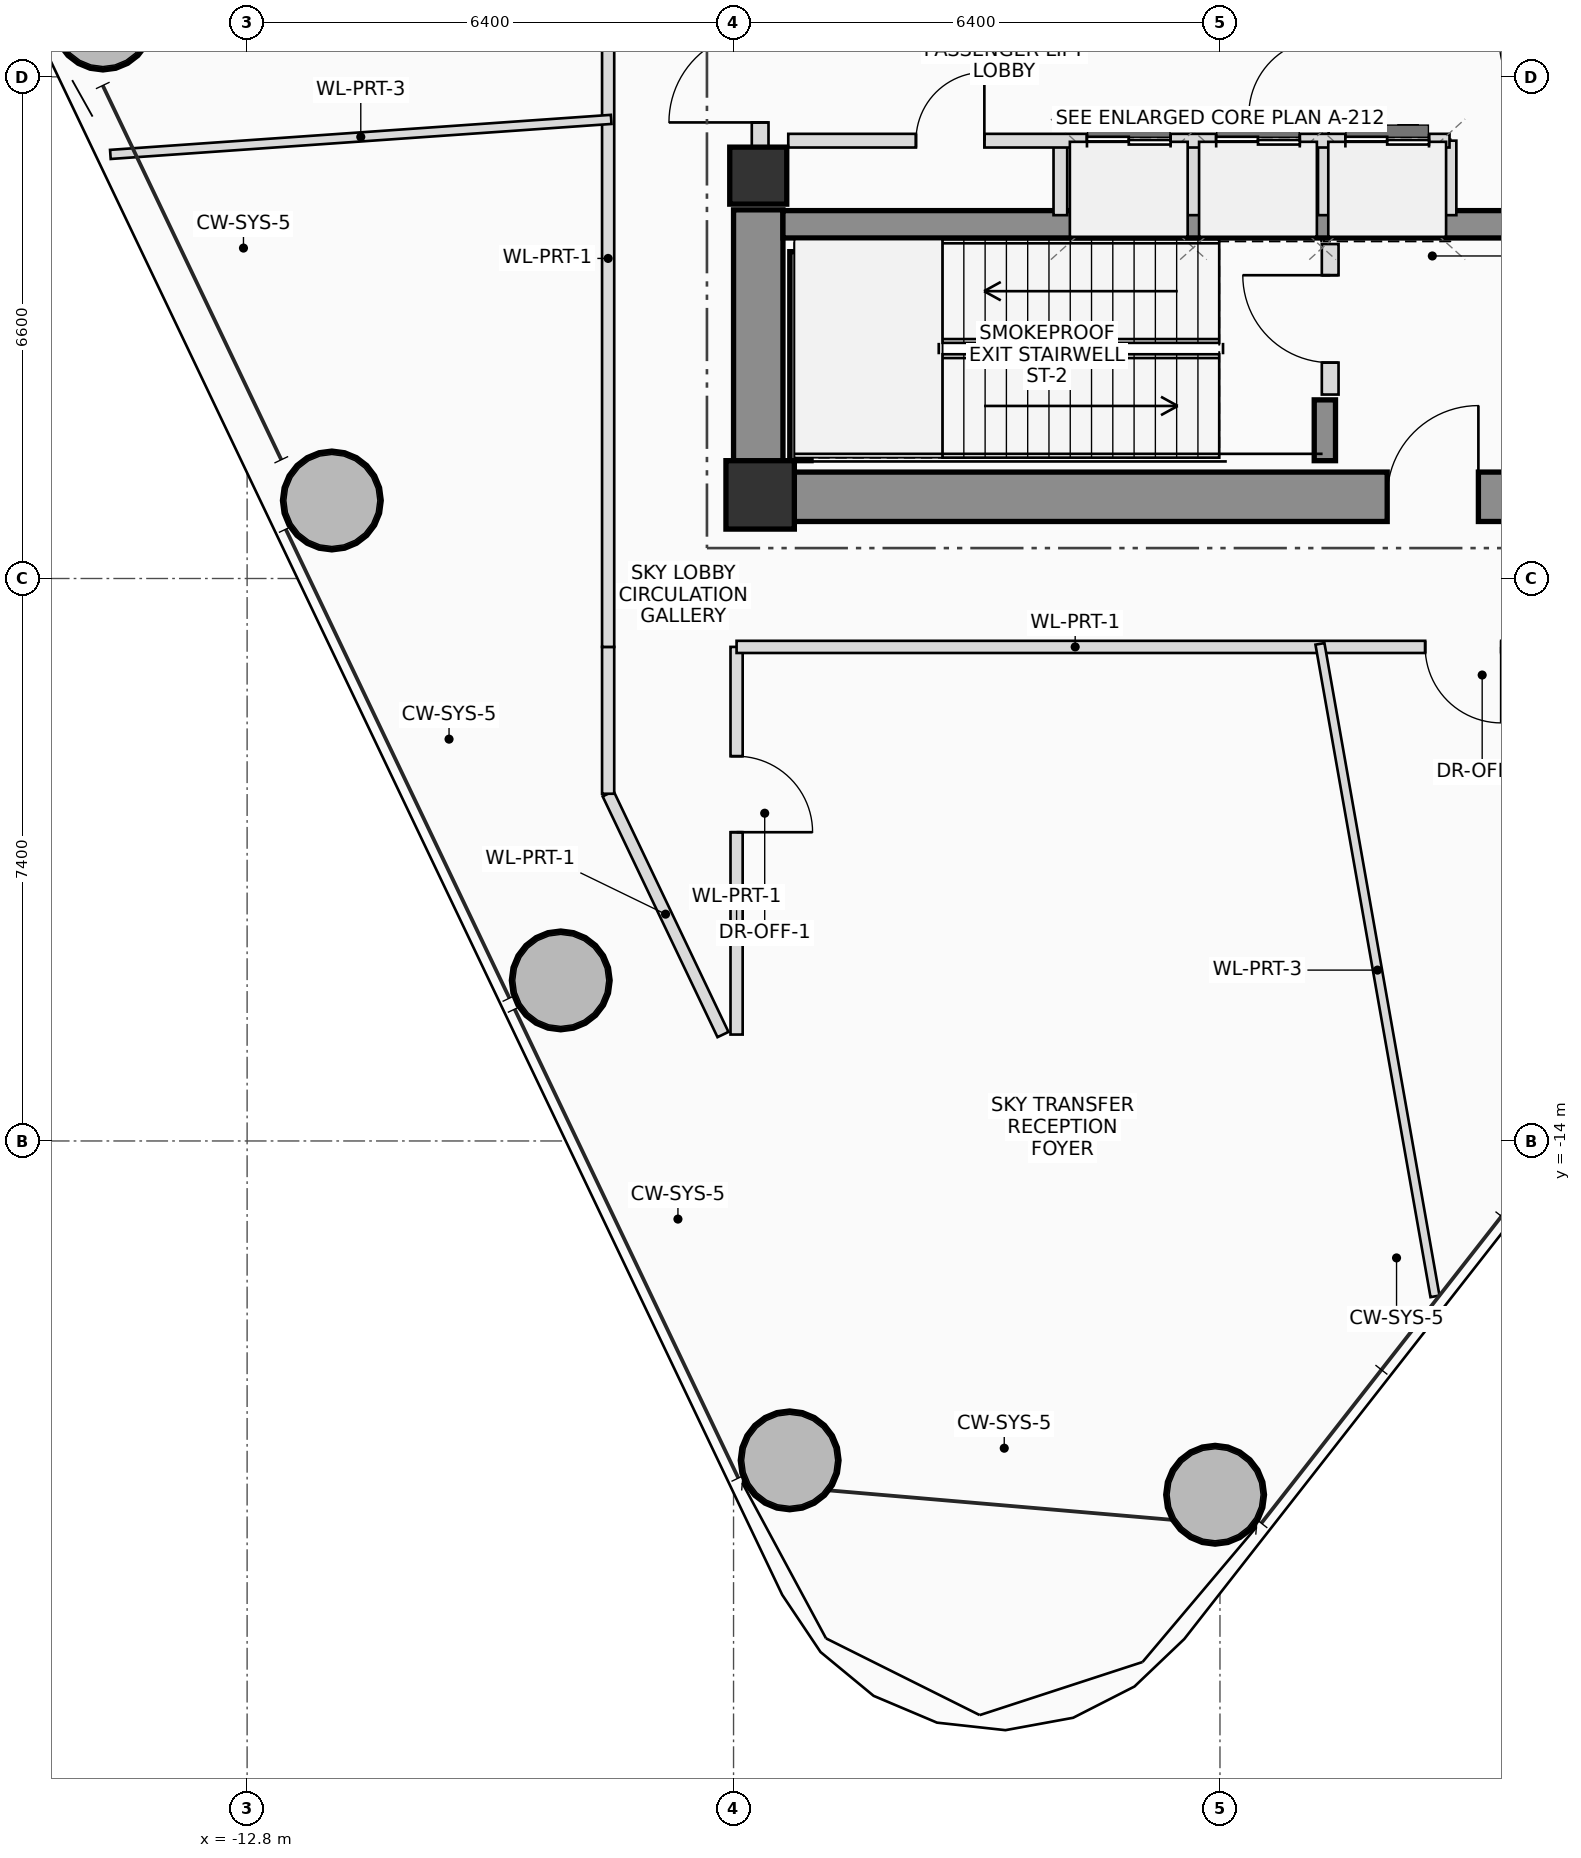
"""IFC4 building model, lengths in metres.
Left out: names, types, materials, properties, quantities, classifications, styles, units other than length and angle.
Written with IfcOpenShell. Run it as: python <this file> out.ifc"""

import sys

from ifc_helpers import new_model, si_unit, direction, frame, frame_2d, origin, origin_2d, place, context, subcontext, project, spatial, rectangle, hollow_circle, extrude, source, transform, mapped, element, fill, save


model = new_model("IFC4")
c1 = context("Model", 3, precision=1e-05, world=origin(), true_north=direction((0.0, 1.0)))
c2 = subcontext(c1, "Body", "Model", "MODEL_VIEW")
j1 = project(units=[si_unit("LENGTHUNIT", "METRE"), si_unit("PLANEANGLEUNIT", "RADIAN")], contexts=[c1])
p1 = place(None, origin())
s1 = spatial("IfcSite", under=j1, at=p1, CompositionType="ELEMENT")
p2 = place(p1, origin())
s2 = spatial("IfcBuilding", under=s1, at=p2, CompositionType="ELEMENT")
p3 = place(p2, frame((0.0, 0.0, 125.0)))
s3 = spatial("IfcBuildingStorey", under=s2, at=p3, CompositionType="ELEMENT", Elevation=125.0)
m1 = source(origin(), c2, "Body", "SweptSolid", [
    extrude(rectangle(XDim=0.9, YDim=0.9, at=origin_2d()), origin(), (0.0, 0.0, 1.0), 4.5),
])
p4 = place(p3, frame((-6.05, -5.5, 0.0), z_axis=(0.0, 0.0, 1.0), x_axis=(1.0, 0.0, 0.0)))
e1 = element("IfcColumn", 1, at=p4, inside=s3, PredefinedType="COLUMN", context=c2, shape_type="MappedRepresentation", body=[
    mapped(m1, transform((0.0, 0.0, 0.0), scale=1.0)),
])
p5 = place(p3, frame((-6.4, -5.525, 0.0), z_axis=(0.0, 0.0, 1.0), x_axis=(1.0, 0.0, 0.0)))
e2 = element("IfcWall", 2, at=p5, inside=s3, PredefinedType="SHEAR", context=c2, shape_type="SweptSolid", body=[
    extrude(rectangle(XDim=12.8, YDim=0.65, at=frame_2d((6.4, 0.0))), origin(), (0.0, 0.0, 1.0), 4.5),
])
p6 = place(p5, frame((8.6, 0.0, 0.0)))
e3 = element("IfcOpeningElement", 3, at=p6, cuts=e2, PredefinedType="OPENING", context=c2, shape_type="SweptSolid", body=[
    extrude(rectangle(XDim=1.2, YDim=2.2, at=frame_2d((0.6, 1.1))), frame((0.0, 0.335, 0.0), z_axis=(0.0, -1.0, 0.0), x_axis=(1.0, 0.0, 0.0)), (0.0, 0.0, 1.0), 0.67),
])
p7 = place(p3, frame((-6.075, -5.2, 0.0), z_axis=(0.0, 0.0, 1.0), x_axis=(0.0, 1.0, 0.0)))
e4 = element("IfcWall", 4, at=p7, inside=s3, PredefinedType="SHEAR", context=c2, shape_type="SweptSolid", body=[
    extrude(rectangle(XDim=3.45, YDim=0.65, at=frame_2d((1.725, 0.0))), origin(), (0.0, 0.0, 1.0), 4.5),
])
p8 = place(p3, frame((-5.75, -1.94, 0.0), z_axis=(0.0, 0.0, 1.0), x_axis=(1.0, 0.0, 0.0)))
e5 = element("IfcWall", 5, at=p8, inside=s3, PredefinedType="SHEAR", context=c2, shape_type="SweptSolid", body=[
    extrude(rectangle(XDim=11.5, YDim=0.36, at=frame_2d((5.75, 0.0))), origin(), (0.0, 0.0, 1.0), 4.5),
])
p9 = place(p3, frame((-5.52, -5.05, 0.0), z_axis=(0.0, 0.0, 1.0), x_axis=(0.0, 1.0, 0.0)))
e6 = element("IfcWall", 6, at=p9, inside=s3, PredefinedType="SHEAR", context=c2, shape_type="SweptSolid", body=[
    extrude(rectangle(XDim=2.75, YDim=0.28, at=frame_2d((1.375, 0.0))), origin(), (0.0, 0.0, 1.0), 4.5),
])
p10 = place(p3, frame((1.38, -5.05, 0.0), z_axis=(0.0, 0.0, 1.0), x_axis=(0.0, 1.0, 0.0)))
e7 = element("IfcWall", 7, at=p10, inside=s3, PredefinedType="SHEAR", context=c2, shape_type="SweptSolid", body=[
    extrude(rectangle(XDim=0.8, YDim=0.28, at=frame_2d((0.4, 0.0))), origin(), (0.0, 0.0, 1.0), 4.5),
])
m2 = source(origin(), c2, "Body", "SweptSolid", [
    extrude(rectangle(XDim=0.75, YDim=0.75, at=origin_2d()), origin(), (0.0, 0.0, 1.0), 4.5),
])
p11 = place(p3, frame((-6.075, -1.3, 0.0), z_axis=(0.0, 0.0, 1.0), x_axis=(1.0, 0.0, 0.0)))
e8 = element("IfcColumn", 8, at=p11, inside=s3, PredefinedType="COLUMN", context=c2, shape_type="MappedRepresentation", body=[
    mapped(m2, transform((0.0, 0.0, 0.0), scale=1.0)),
])
m3 = source(origin(), c2, "Body", "SweptSolid", [
    extrude(hollow_circle(Radius=0.65, WallThickness=0.045, at=origin_2d()), origin(), (0.0, 0.0, 1.0), 4.5),
])
for number, where, z_axis, x_axis in (
    (9, (-0.064, -18.655, 0.0), (0.0, 0.0, 1.0), (1.0, 0.0, 0.0)),
    (10, (-14.697, 0.74, 0.0), (0.0, 0.0, 1.0), (1.0, 0.0, 0.0)),
    (11, (-11.685, -5.573, 0.0), (0.0, 0.0, 1.0), (1.0, 0.0, 0.0)),
    (12, (-8.674, -11.888, 0.0), (0.0, 0.0, 1.0), (1.0, 0.0, 0.0)),
    (13, (-5.662, -18.202, 0.0), (0.0, 0.0, 1.0), (1.0, 0.0, 0.0)),
):
    element("IfcColumn", number, at=place(p3, frame(where, z_axis=z_axis, x_axis=x_axis)), inside=s3, PredefinedType="COLUMN", context=c2, shape_type="MappedRepresentation", body=[
        mapped(m3, transform((0.0, 0.0, 0.0), scale=1.0)),
    ])
p12 = place(p3, frame((-6.05, -0.95, 0.0), z_axis=(0.0, 0.0, 1.0), x_axis=(0.0, 1.0, 0.0)))
e14 = element("IfcWall", 14, at=p12, inside=s3, PredefinedType="PLUMBINGWALL", context=c2, shape_type="SweptSolid", body=[
    extrude(rectangle(XDim=1.9, YDim=0.22, at=frame_2d((0.95, 0.0))), origin(), (0.0, 0.0, 1.0), 3.28),
])
p13 = place(p12, frame((0.35, 0.0, 0.0)))
e15 = element("IfcOpeningElement", 15, at=p13, cuts=e14, PredefinedType="OPENING", context=c2, shape_type="SweptSolid", body=[
    extrude(rectangle(XDim=1.2, YDim=2.2, at=frame_2d((0.6, 1.1))), frame((0.0, 0.12, 0.0), z_axis=(0.0, -1.0, 0.0), x_axis=(1.0, 0.0, 0.0)), (0.0, 0.0, 1.0), 0.24),
])
p14 = place(p3, frame((1.45, -4.18, 0.0), z_axis=(0.0, 0.0, 1.0), x_axis=(0.0, 1.0, 0.0)))
e16 = element("IfcWall", 16, at=p14, inside=s3, PredefinedType="PLUMBINGWALL", context=c2, shape_type="SweptSolid", body=[
    extrude(rectangle(XDim=1.98, YDim=0.22, at=frame_2d((0.99, 0.0))), origin(), (0.0, 0.0, 1.0), 4.3),
])
p15 = place(p14, frame((0.42, 0.0, 0.0)))
e17 = element("IfcOpeningElement", 17, at=p15, cuts=e16, PredefinedType="OPENING", context=c2, shape_type="SweptSolid", body=[
    extrude(rectangle(XDim=1.15, YDim=2.15, at=frame_2d((0.575, 1.075))), frame((0.0, 0.12, 0.0), z_axis=(0.0, -1.0, 0.0), x_axis=(1.0, 0.0, 0.0)), (0.0, 0.0, 1.0), 0.24),
])
p16 = place(p3, frame((1.38, -0.84, 0.0), z_axis=(0.0, 0.0, 1.0), x_axis=(0.0, 1.0, 0.0)))
e18 = element("IfcWall", 18, at=p16, inside=s3, PredefinedType="PARTITIONING", context=c2, shape_type="SweptSolid", body=[
    extrude(rectangle(XDim=1.68, YDim=0.1, at=frame_2d((0.84, 0.0))), origin(), (0.0, 0.0, 1.0), 4.3),
])
p17 = place(p16, frame((0.34, 0.0, 0.0)))
e19 = element("IfcOpeningElement", 19, at=p17, cuts=e18, PredefinedType="OPENING", context=c2, shape_type="SweptSolid", body=[
    extrude(rectangle(XDim=1.0, YDim=2.25, at=frame_2d((0.5, 1.125))), frame((0.0, 0.06, 0.0), z_axis=(0.0, -1.0, 0.0), x_axis=(1.0, 0.0, 0.0)), (0.0, 0.0, 1.0), 0.12),
])
for number, where, z_axis, x_axis in (
    (20, (-2.1, -1.82, 0.0), (0.0, 0.0, 1.0), (0.0, 1.0, 0.0)),
    (21, (-0.35, -1.82, 0.0), (0.0, 0.0, 1.0), (0.0, 1.0, 0.0)),
    (22, (1.38, -1.82, 0.0), (0.0, 0.0, 1.0), (0.0, 1.0, 0.0)),
    (23, (3.02, -1.82, 0.0), (0.0, 0.0, 1.0), (0.0, 1.0, 0.0)),
):
    element("IfcWall", number, at=place(p3, frame(where, z_axis=z_axis, x_axis=x_axis)), inside=s3, PredefinedType="PLUMBINGWALL", context=c2, shape_type="SweptSolid", body=[
        extrude(rectangle(XDim=0.98, YDim=0.18, at=frame_2d((0.49, 0.0))), origin(), (0.0, 0.0, 1.0), 4.3),
    ])
p18 = place(p3, frame((-5.68, -0.84, 0.0), z_axis=(0.0, 0.0, 1.0), x_axis=(1.0, 0.0, 0.0)))
e24 = element("IfcWall", 24, at=p18, inside=s3, PredefinedType="PLUMBINGWALL", context=c2, shape_type="SweptSolid", body=[
    extrude(rectangle(XDim=8.7, YDim=0.18, at=frame_2d((4.35, 0.0))), origin(), (0.0, 0.0, 1.0), 4.3),
])
p19 = place(p18, frame((1.68, 0.0, 0.0)))
e25 = element("IfcOpeningElement", 25, at=p19, cuts=e24, PredefinedType="OPENING", context=c2, shape_type="SweptSolid", body=[
    extrude(rectangle(XDim=0.9, YDim=2.05, at=frame_2d((0.45, 1.025))), frame((0.0, 0.1, 0.0), z_axis=(0.0, -1.0, 0.0), x_axis=(1.0, 0.0, 0.0)), (0.0, 0.0, 1.0), 0.2),
])
p20 = place(p18, frame((3.93, 0.0, 0.0)))
e26 = element("IfcOpeningElement", 26, at=p20, cuts=e24, PredefinedType="OPENING", context=c2, shape_type="SweptSolid", body=[
    extrude(rectangle(XDim=1.1, YDim=2.2, at=frame_2d((0.55, 1.1))), frame((0.0, 0.1, 0.0), z_axis=(0.0, -1.0, 0.0), x_axis=(1.0, 0.0, 0.0)), (0.0, 0.0, 1.0), 0.2),
])
p21 = place(p18, frame((5.63, 0.0, 0.0)))
e27 = element("IfcOpeningElement", 27, at=p21, cuts=e24, PredefinedType="OPENING", context=c2, shape_type="SweptSolid", body=[
    extrude(rectangle(XDim=1.1, YDim=2.2, at=frame_2d((0.55, 1.1))), frame((0.0, 0.1, 0.0), z_axis=(0.0, -1.0, 0.0), x_axis=(1.0, 0.0, 0.0)), (0.0, 0.0, 1.0), 0.2),
])
p22 = place(p18, frame((7.33, 0.0, 0.0)))
e28 = element("IfcOpeningElement", 28, at=p22, cuts=e24, PredefinedType="OPENING", context=c2, shape_type="SweptSolid", body=[
    extrude(rectangle(XDim=1.1, YDim=2.2, at=frame_2d((0.55, 1.1))), frame((0.0, 0.1, 0.0), z_axis=(0.0, -1.0, 0.0), x_axis=(1.0, 0.0, 0.0)), (0.0, 0.0, 1.0), 0.2),
])
p23 = place(p3, frame((-6.36, -7.5, 0.0), z_axis=(0.0, 0.0, 1.0), x_axis=(0.0, -1.0, 0.0)))
e29 = element("IfcWall", 29, at=p23, inside=s3, PredefinedType="PARTITIONING", context=c2, shape_type="SweptSolid", body=[
    extrude(rectangle(XDim=5.1, YDim=0.16, at=frame_2d((2.55, 0.0))), origin(), (0.0, 0.0, 1.0), 4.3),
])
p24 = place(p23, frame((1.438, 0.0, 0.0)))
e30 = element("IfcOpeningElement", 30, at=p24, cuts=e29, PredefinedType="OPENING", context=c2, shape_type="SweptSolid", body=[
    extrude(rectangle(XDim=1.0, YDim=2.25, at=frame_2d((0.5, 1.125))), frame((0.0, 0.09, 0.0), z_axis=(0.0, -1.0, 0.0), x_axis=(1.0, 0.0, 0.0)), (0.0, 0.0, 1.0), 0.18),
])
p25 = place(p3, frame((-6.539, -12.6, 0.0), z_axis=(0.0, 0.0, 1.0), x_axis=(-0.430527444218, 0.902577486853, 0.0)))
e31 = element("IfcWall", 31, at=p25, inside=s3, PredefinedType="PARTITIONING", context=c2, shape_type="SweptSolid", body=[
    extrude(rectangle(XDim=3.51, YDim=0.16, at=frame_2d((1.755, 0.0))), origin(), (0.0, 0.0, 1.0), 3.655),
])
p26 = place(p3, frame((-8.05, -9.432, 0.0), z_axis=(0.0, 0.0, 1.0), x_axis=(0.0, 1.0, 0.0)))
e32 = element("IfcWall", 32, at=p26, inside=s3, PredefinedType="PARTITIONING", context=c2, shape_type="SweptSolid", body=[
    extrude(rectangle(XDim=1.932, YDim=0.16, at=frame_2d((0.966, 0.0))), origin(), (0.0, 0.0, 1.0), 3.855),
])
p27 = place(p3, frame((-8.05, -7.5, 0.0), z_axis=(0.0, 0.0, 1.0), x_axis=(0.0, 1.0, 0.0)))
e33 = element("IfcWall", 33, at=p27, inside=s3, PredefinedType="PARTITIONING", context=c2, shape_type="SweptSolid", body=[
    extrude(rectangle(XDim=15.0, YDim=0.16, at=frame_2d((7.5, 0.0))), origin(), (0.0, 0.0, 1.0), 3.655),
])
p28 = place(p27, frame((10.372, 0.0, 0.0)))
e34 = element("IfcOpeningElement", 34, at=p28, cuts=e33, PredefinedType="OPENING", context=c2, shape_type="SweptSolid", body=[
    extrude(rectangle(XDim=1.0, YDim=2.25, at=frame_2d((0.5, 1.125))), frame((0.0, 0.09, 0.0), z_axis=(0.0, -1.0, 0.0), x_axis=(1.0, 0.0, 0.0)), (0.0, 0.0, 1.0), 0.18),
])
p29 = place(p3, frame((5.25, -7.5, 0.0), z_axis=(0.0, 0.0, 1.0), x_axis=(-1.0, 0.0, 0.0)))
e35 = element("IfcWall", 35, at=p29, inside=s3, PredefinedType="PARTITIONING", context=c2, shape_type="SweptSolid", body=[
    extrude(rectangle(XDim=11.61, YDim=0.16, at=frame_2d((5.805, 0.0))), origin(), (0.0, 0.0, 1.0), 3.655),
])
p30 = place(p29, frame((1.55, 0.0, 0.0)))
e36 = element("IfcOpeningElement", 36, at=p30, cuts=e35, PredefinedType="OPENING", context=c2, shape_type="SweptSolid", body=[
    extrude(rectangle(XDim=1.0, YDim=2.25, at=frame_2d((0.5, 1.125))), frame((0.0, 0.09, 0.0), z_axis=(0.0, -1.0, 0.0), x_axis=(1.0, 0.0, 0.0)), (0.0, 0.0, 1.0), 0.18),
])
p31 = place(p3, frame((-8.01, -0.56, 0.0), z_axis=(0.0, 0.0, 1.0), x_axis=(-0.997562133009, -0.069783886292, 0.0)))
e37 = element("IfcWall", 37, at=p31, inside=s3, PredefinedType="PARTITIONING", context=c2, shape_type="SweptSolid", body=[
    extrude(rectangle(XDim=6.605, YDim=0.12, at=frame_2d((3.303, 0.0))), origin(), (0.0, 0.0, 1.0), 3.815),
])
p32 = place(p3, frame((1.315, -7.46, 0.0), z_axis=(0.0, 0.0, 1.0), x_axis=(0.173652714894, -0.984806952966, 0.0)))
e38 = element("IfcWall", 38, at=p32, inside=s3, PredefinedType="PARTITIONING", context=c2, shape_type="SweptSolid", body=[
    extrude(rectangle(XDim=8.717, YDim=0.12, at=frame_2d((4.358, 0.0))), origin(), (0.0, 0.0, 1.0), 3.815),
])
p33 = place(p6, origin())
e39 = element("IfcDoor", 39, at=p33, inside=s3, OperationType="SINGLE_SWING_RIGHT", PredefinedType="DOOR", context=c2, shape_type="SweptSolid", body=[
    extrude(rectangle(XDim=1.2, YDim=2.2, at=frame_2d((0.6, 1.1))), frame((0.0, 0.025, 0.0), z_axis=(0.0, -1.0, 0.0), x_axis=(1.0, 0.0, 0.0)), (0.0, 0.0, 1.0), 0.05),
])
fill(e3, e39)
p34 = place(p13, origin())
e40 = element("IfcDoor", 40, at=p34, inside=s3, OperationType="SINGLE_SWING_LEFT", PredefinedType="DOOR", context=c2, shape_type="SweptSolid", body=[
    extrude(rectangle(XDim=1.2, YDim=2.2, at=frame_2d((0.6, 1.1))), frame((0.0, 0.025, 0.0), z_axis=(0.0, -1.0, 0.0), x_axis=(1.0, 0.0, 0.0)), (0.0, 0.0, 1.0), 0.05),
])
fill(e15, e40)
p35 = place(p15, origin())
e41 = element("IfcDoor", 41, at=p35, inside=s3, OperationType="SINGLE_SWING_RIGHT", PredefinedType="DOOR", context=c2, shape_type="SweptSolid", body=[
    extrude(rectangle(XDim=1.15, YDim=2.15, at=frame_2d((0.575, 1.075))), frame((0.0, 0.025, 0.0), z_axis=(0.0, -1.0, 0.0), x_axis=(1.0, 0.0, 0.0)), (0.0, 0.0, 1.0), 0.05),
])
fill(e17, e41)
p36 = place(p17, origin())
e42 = element("IfcDoor", 42, at=p36, inside=s3, OperationType="SINGLE_SWING_LEFT", PredefinedType="DOOR", context=c2, shape_type="SweptSolid", body=[
    extrude(rectangle(XDim=1.0, YDim=2.25, at=frame_2d((0.5, 1.125))), frame((0.0, 0.025, 0.0), z_axis=(0.0, -1.0, 0.0), x_axis=(1.0, 0.0, 0.0)), (0.0, 0.0, 1.0), 0.05),
])
fill(e19, e42)
p37 = place(p19, origin())
e43 = element("IfcDoor", 43, at=p37, inside=s3, OperationType="SINGLE_SWING_RIGHT", PredefinedType="DOOR", context=c2, shape_type="SweptSolid", body=[
    extrude(rectangle(XDim=0.9, YDim=2.05, at=frame_2d((0.45, 1.025))), frame((0.0, 0.025, 0.0), z_axis=(0.0, -1.0, 0.0), x_axis=(1.0, 0.0, 0.0)), (0.0, 0.0, 1.0), 0.05),
])
fill(e25, e43)
p38 = place(p20, origin())
e44 = element("IfcDoor", 44, at=p38, inside=s3, OperationType="DOUBLE_DOOR_SLIDING", PredefinedType="DOOR", context=c2, shape_type="SweptSolid", body=[
    extrude(rectangle(XDim=1.1, YDim=2.2, at=frame_2d((0.55, 1.1))), frame((0.0, 0.025, 0.0), z_axis=(0.0, -1.0, 0.0), x_axis=(1.0, 0.0, 0.0)), (0.0, 0.0, 1.0), 0.05),
])
fill(e26, e44)
p39 = place(p21, origin())
e45 = element("IfcDoor", 45, at=p39, inside=s3, OperationType="DOUBLE_DOOR_SLIDING", PredefinedType="DOOR", context=c2, shape_type="SweptSolid", body=[
    extrude(rectangle(XDim=1.1, YDim=2.2, at=frame_2d((0.55, 1.1))), frame((0.0, 0.025, 0.0), z_axis=(0.0, -1.0, 0.0), x_axis=(1.0, 0.0, 0.0)), (0.0, 0.0, 1.0), 0.05),
])
fill(e27, e45)
p40 = place(p22, origin())
e46 = element("IfcDoor", 46, at=p40, inside=s3, OperationType="DOUBLE_DOOR_SLIDING", PredefinedType="DOOR", context=c2, shape_type="SweptSolid", body=[
    extrude(rectangle(XDim=1.1, YDim=2.2, at=frame_2d((0.55, 1.1))), frame((0.0, 0.025, 0.0), z_axis=(0.0, -1.0, 0.0), x_axis=(1.0, 0.0, 0.0)), (0.0, 0.0, 1.0), 0.05),
])
fill(e28, e46)
p41 = place(p24, origin())
e47 = element("IfcDoor", 47, at=p41, inside=s3, OperationType="SINGLE_SWING_RIGHT", PredefinedType="DOOR", context=c2, shape_type="SweptSolid", body=[
    extrude(rectangle(XDim=1.0, YDim=2.25, at=frame_2d((0.5, 1.125))), frame((0.0, 0.025, 0.0), z_axis=(0.0, -1.0, 0.0), x_axis=(1.0, 0.0, 0.0)), (0.0, 0.0, 1.0), 0.05),
])
fill(e30, e47)
p42 = place(p30, origin())
e48 = element("IfcDoor", 48, at=p42, inside=s3, OperationType="SINGLE_SWING_LEFT", PredefinedType="DOOR", context=c2, shape_type="SweptSolid", body=[
    extrude(rectangle(XDim=1.0, YDim=2.25, at=frame_2d((0.5, 1.125))), frame((0.0, 0.025, 0.0), z_axis=(0.0, -1.0, 0.0), x_axis=(1.0, 0.0, 0.0)), (0.0, 0.0, 1.0), 0.05),
])
fill(e36, e48)
save(model, sys.argv[1])
